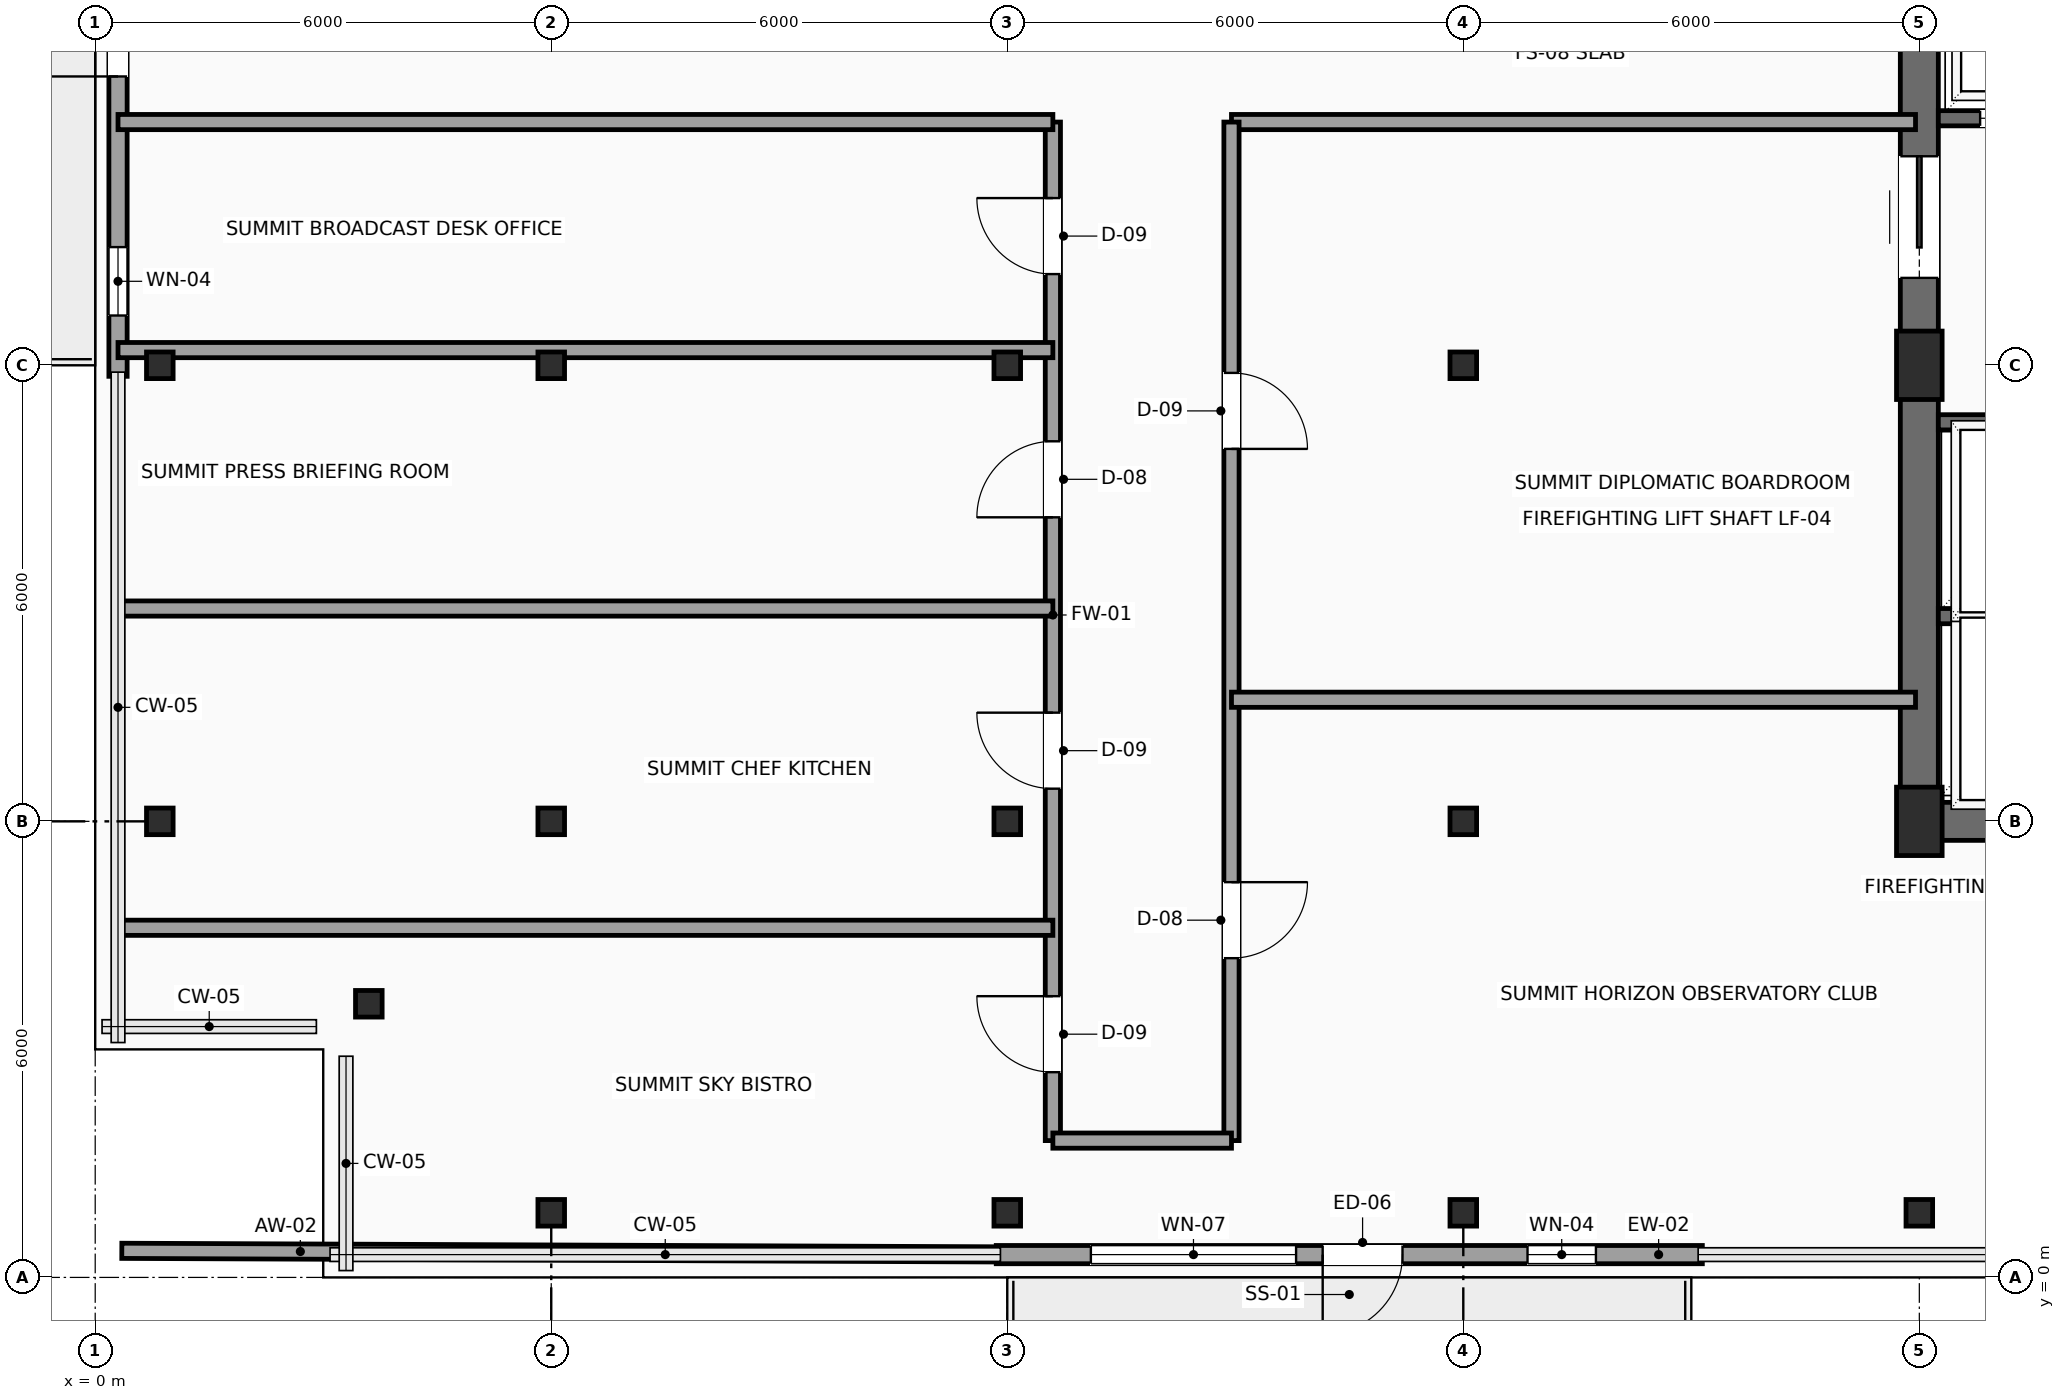
"""IFC4 building model, lengths in metres.
Left out: names, types, materials, properties, quantities, classifications, styles, units other than length and angle.
Written with IfcOpenShell. Run it as: python <this file> out.ifc"""

import sys

from ifc_helpers import new_model, si_unit, direction, frame, frame_2d, origin, origin_2d, place, context, subcontext, project, spatial, rectangle, hollow_rectangle, extrude, element, fill, save


model = new_model("IFC4")
c1 = context("Model", 3, precision=1e-05, world=origin(), true_north=direction((0.0, 1.0)))
c2 = subcontext(c1, "Body", "Model", "MODEL_VIEW")
j1 = project(units=[si_unit("LENGTHUNIT", "METRE"), si_unit("PLANEANGLEUNIT", "RADIAN")], contexts=[c1])
p1 = place(None, origin())
s1 = spatial("IfcSite", under=j1, at=p1, CompositionType="ELEMENT")
p2 = place(p1, origin())
s2 = spatial("IfcBuilding", under=s1, at=p2, CompositionType="ELEMENT")
p3 = place(p2, frame((0.0, 0.0, 278.2)))
s3 = spatial("IfcBuildingStorey", under=s2, at=p3, CompositionType="ELEMENT", Elevation=278.2)
for number, where, z_axis, x_axis in (
    (1, (24.0, 6.0, 0.0), (0.0, 0.0, 1.0), (1.0, 0.0, 0.0)),
    (2, (24.0, 12.0, 0.0), (0.0, 0.0, 1.0), (1.0, 0.0, 0.0)),
):
    element("IfcColumn", number, at=place(p3, frame(where, z_axis=z_axis, x_axis=x_axis)), inside=s3, PredefinedType="COLUMN", context=c2, shape_type="SweptSolid", body=[
        extrude(rectangle(XDim=0.6, YDim=0.9, at=origin_2d()), origin(), (0.0, 0.0, 1.0), 3.5),
    ])
for number, where, z_axis, x_axis in (
    (3, (3.6, 3.6, 0.0), (0.0, 0.0, 1.0), (1.0, 0.0, 0.0)),
    (4, (0.85, 6.0, 0.0), (0.0, 0.0, 1.0), (1.0, 0.0, 0.0)),
    (5, (0.85, 12.0, 0.0), (0.0, 0.0, 1.0), (1.0, 0.0, 0.0)),
    (6, (6.0, 0.85, 0.0), (0.0, 0.0, 1.0), (1.0, 0.0, 0.0)),
    (7, (6.0, 6.0, 0.0), (0.0, 0.0, 1.0), (1.0, 0.0, 0.0)),
    (8, (6.0, 12.0, 0.0), (0.0, 0.0, 1.0), (1.0, 0.0, 0.0)),
    (9, (12.0, 0.85, 0.0), (0.0, 0.0, 1.0), (1.0, 0.0, 0.0)),
    (10, (12.0, 6.0, 0.0), (0.0, 0.0, 1.0), (1.0, 0.0, 0.0)),
    (11, (12.0, 12.0, 0.0), (0.0, 0.0, 1.0), (1.0, 0.0, 0.0)),
    (12, (18.0, 0.85, 0.0), (0.0, 0.0, 1.0), (1.0, 0.0, 0.0)),
    (13, (18.0, 6.0, 0.0), (0.0, 0.0, 1.0), (1.0, 0.0, 0.0)),
    (14, (18.0, 12.0, 0.0), (0.0, 0.0, 1.0), (1.0, 0.0, 0.0)),
    (15, (24.0, 0.85, 0.0), (0.0, 0.0, 1.0), (1.0, 0.0, 0.0)),
):
    element("IfcColumn", number, at=place(p3, frame(where, z_axis=z_axis, x_axis=x_axis)), inside=s3, PredefinedType="COLUMN", context=c2, shape_type="SweptSolid", body=[
        extrude(hollow_rectangle(XDim=0.35, YDim=0.35, WallThickness=0.016, InnerFilletRadius=0.016, OuterFilletRadius=0.032, at=origin_2d()), origin(), (0.0, 0.0, 1.0), 3.5),
    ])
p4 = place(p3, frame((21.145, 0.3, 0.0), z_axis=(0.0, 0.0, 1.0), x_axis=(-1.0, 0.0, 0.0)))
e16 = element("IfcWall", 16, at=p4, inside=s3, PredefinedType="SOLIDWALL", context=c2, shape_type="SweptSolid", body=[
    extrude(rectangle(XDim=9.29, YDim=0.24, at=frame_2d((4.645, 0.0))), origin(), (0.0, 0.0, 1.0), 3.3),
])
p5 = place(p4, frame((3.945, 0.0, 0.0)))
e17 = element("IfcOpeningElement", 17, at=p5, cuts=e16, PredefinedType="OPENING", context=c2, shape_type="SweptSolid", body=[
    extrude(rectangle(XDim=1.05, YDim=2.2, at=frame_2d((0.525, 1.1))), frame((0.0, 0.13, 0.0), z_axis=(0.0, -1.0, 0.0), x_axis=(1.0, 0.0, 0.0)), (0.0, 0.0, 1.0), 0.26),
])
p6 = place(p4, frame((5.345, 0.0, 0.6)))
e18 = element("IfcOpeningElement", 18, at=p6, cuts=e16, PredefinedType="OPENING", context=c2, shape_type="SweptSolid", body=[
    extrude(rectangle(XDim=2.7, YDim=2.3, at=frame_2d((1.35, 1.15))), frame((0.0, 0.13, 0.0), z_axis=(0.0, -1.0, 0.0), x_axis=(1.0, 0.0, 0.0)), (0.0, 0.0, 1.0), 0.26),
])
p7 = place(p4, frame((1.4, 0.0, 0.6)))
e19 = element("IfcOpeningElement", 19, at=p7, cuts=e16, PredefinedType="OPENING", context=c2, shape_type="SweptSolid", body=[
    extrude(rectangle(XDim=0.9, YDim=2.2, at=frame_2d((0.45, 1.1))), frame((0.0, 0.13, 0.0), z_axis=(0.0, -1.0, 0.0), x_axis=(1.0, 0.0, 0.0)), (0.0, 0.0, 1.0), 0.26),
])
p8 = place(p3, frame((0.3, 11.855, 0.0), z_axis=(0.0, 0.0, 1.0), x_axis=(0.0, 1.0, 0.0)))
e20 = element("IfcWall", 20, at=p8, inside=s3, PredefinedType="SOLIDWALL", context=c2, shape_type="SweptSolid", body=[
    extrude(rectangle(XDim=9.29, YDim=0.24, at=frame_2d((4.645, 0.0))), origin(), (0.0, 0.0, 1.0), 3.3),
])
p9 = place(p8, frame((3.945, 0.0, 0.0)))
e21 = element("IfcOpeningElement", 21, at=p9, cuts=e20, PredefinedType="OPENING", context=c2, shape_type="SweptSolid", body=[
    extrude(rectangle(XDim=1.05, YDim=2.2, at=frame_2d((0.525, 1.1))), frame((0.0, 0.13, 0.0), z_axis=(0.0, -1.0, 0.0), x_axis=(1.0, 0.0, 0.0)), (0.0, 0.0, 1.0), 0.26),
])
p10 = place(p8, frame((6.2, 0.0, 0.6)))
e22 = element("IfcOpeningElement", 22, at=p10, cuts=e20, PredefinedType="OPENING", context=c2, shape_type="SweptSolid", body=[
    extrude(rectangle(XDim=2.7, YDim=2.3, at=frame_2d((1.35, 1.15))), frame((0.0, 0.13, 0.0), z_axis=(0.0, -1.0, 0.0), x_axis=(1.0, 0.0, 0.0)), (0.0, 0.0, 1.0), 0.26),
])
p11 = place(p8, frame((0.8, 0.0, 0.6)))
e23 = element("IfcOpeningElement", 23, at=p11, cuts=e20, PredefinedType="OPENING", context=c2, shape_type="SweptSolid", body=[
    extrude(rectangle(XDim=0.9, YDim=2.2, at=frame_2d((0.45, 1.1))), frame((0.0, 0.13, 0.0), z_axis=(0.0, -1.0, 0.0), x_axis=(1.0, 0.0, 0.0)), (0.0, 0.0, 1.0), 0.26),
])
p12 = place(p3, frame((24.0, 6.0, 0.0), z_axis=(0.0, 0.0, 1.0), x_axis=(1.0, 0.0, 0.0)))
e24 = element("IfcWall", 24, at=p12, inside=s3, PredefinedType="SHEAR", context=c2, shape_type="SweptSolid", body=[
    extrude(rectangle(XDim=9.6, YDim=0.5, at=frame_2d((4.8, 0.0))), origin(), (0.0, 0.0, 1.0), 3.3),
])
p13 = place(p3, frame((24.0, 6.0, 0.0), z_axis=(0.0, 0.0, 1.0), x_axis=(0.0, 1.0, 0.0)))
e25 = element("IfcWall", 25, at=p13, inside=s3, PredefinedType="SHEAR", context=c2, shape_type="SweptSolid", body=[
    extrude(rectangle(XDim=12.0, YDim=0.5, at=frame_2d((6.0, 0.0))), origin(), (0.0, 0.0, 1.0), 3.3),
])
p14 = place(p13, frame((7.15, 0.0, 0.0)))
e26 = element("IfcOpeningElement", 26, at=p14, cuts=e25, PredefinedType="OPENING", context=c2, shape_type="SweptSolid", body=[
    extrude(rectangle(XDim=1.6, YDim=2.3, at=frame_2d((0.8, 1.15))), frame((0.0, 0.26, 0.0), z_axis=(0.0, -1.0, 0.0), x_axis=(1.0, 0.0, 0.0)), (0.0, 0.0, 1.0), 0.52),
])
for number, where, z_axis, x_axis in (
    (27, (24.25, 8.7, 0.0), (0.0, 0.0, 1.0), (1.0, 0.0, 0.0)),
    (28, (24.25, 11.25, 0.0), (0.0, 0.0, 1.0), (1.0, 0.0, 0.0)),
):
    element("IfcWall", number, at=place(p3, frame(where, z_axis=z_axis, x_axis=x_axis)), inside=s3, PredefinedType="SHEAR", context=c2, shape_type="SweptSolid", body=[
        extrude(rectangle(XDim=2.17, YDim=0.2, at=frame_2d((1.085, 0.0))), origin(), (0.0, 0.0, 1.0), 3.3),
    ])
p15 = place(p3, frame((24.25, 15.25, 0.0), z_axis=(0.0, 0.0, 1.0), x_axis=(1.0, 0.0, 0.0)))
e29 = element("IfcWall", 29, at=p15, inside=s3, PredefinedType="SHEAR", context=c2, shape_type="SweptSolid", body=[
    extrude(rectangle(XDim=5.2, YDim=0.2, at=frame_2d((2.6, 0.0))), origin(), (0.0, 0.0, 1.0), 3.3),
])
p16 = place(p15, frame((0.55, 0.0, 0.0)))
e30 = element("IfcOpeningElement", 30, at=p16, cuts=e29, PredefinedType="OPENING", context=c2, shape_type="SweptSolid", body=[
    extrude(rectangle(XDim=1.2, YDim=2.2, at=frame_2d((0.6, 1.1))), frame((0.0, 0.11, 0.0), z_axis=(0.0, -1.0, 0.0), x_axis=(1.0, 0.0, 0.0)), (0.0, 0.0, 1.0), 0.22),
])
p17 = place(p15, frame((3.15, 0.0, 0.0)))
e31 = element("IfcOpeningElement", 31, at=p17, cuts=e29, PredefinedType="OPENING", context=c2, shape_type="SweptSolid", body=[
    extrude(rectangle(XDim=1.2, YDim=2.2, at=frame_2d((0.6, 1.1))), frame((0.0, 0.11, 0.0), z_axis=(0.0, -1.0, 0.0), x_axis=(1.0, 0.0, 0.0)), (0.0, 0.0, 1.0), 0.22),
])
p18 = place(p3, frame((12.6, 1.8, 0.0), z_axis=(0.0, 0.0, 1.0), x_axis=(0.0, 1.0, 0.0)))
e32 = element("IfcWall", 32, at=p18, inside=s3, PredefinedType="SOLIDWALL", context=c2, shape_type="SweptSolid", body=[
    extrude(rectangle(XDim=13.4, YDim=0.2, at=frame_2d((6.7, 0.0))), origin(), (0.0, 0.0, 1.0), 3.3),
])
p19 = place(p18, frame((0.9, 0.0, 0.0)))
e33 = element("IfcOpeningElement", 33, at=p19, cuts=e32, PredefinedType="OPENING", context=c2, shape_type="SweptSolid", body=[
    extrude(rectangle(XDim=1.0, YDim=2.2, at=frame_2d((0.5, 1.1))), frame((0.0, 0.11, 0.0), z_axis=(0.0, -1.0, 0.0), x_axis=(1.0, 0.0, 0.0)), (0.0, 0.0, 1.0), 0.22),
])
p20 = place(p18, frame((4.63, 0.0, 0.0)))
e34 = element("IfcOpeningElement", 34, at=p20, cuts=e32, PredefinedType="OPENING", context=c2, shape_type="SweptSolid", body=[
    extrude(rectangle(XDim=1.0, YDim=2.2, at=frame_2d((0.5, 1.1))), frame((0.0, 0.11, 0.0), z_axis=(0.0, -1.0, 0.0), x_axis=(1.0, 0.0, 0.0)), (0.0, 0.0, 1.0), 0.22),
])
p21 = place(p18, frame((8.2, 0.0, 0.0)))
e35 = element("IfcOpeningElement", 35, at=p21, cuts=e32, PredefinedType="OPENING", context=c2, shape_type="SweptSolid", body=[
    extrude(rectangle(XDim=1.0, YDim=2.2, at=frame_2d((0.5, 1.1))), frame((0.0, 0.11, 0.0), z_axis=(0.0, -1.0, 0.0), x_axis=(1.0, 0.0, 0.0)), (0.0, 0.0, 1.0), 0.22),
])
p22 = place(p18, frame((11.4, 0.0, 0.0)))
e36 = element("IfcOpeningElement", 36, at=p22, cuts=e32, PredefinedType="OPENING", context=c2, shape_type="SweptSolid", body=[
    extrude(rectangle(XDim=1.0, YDim=2.2, at=frame_2d((0.5, 1.1))), frame((0.0, 0.11, 0.0), z_axis=(0.0, -1.0, 0.0), x_axis=(1.0, 0.0, 0.0)), (0.0, 0.0, 1.0), 0.22),
])
p23 = place(p3, frame((12.6, 15.2, 0.0), z_axis=(0.0, 0.0, 1.0), x_axis=(-1.0, 0.0, 0.0)))
e37 = element("IfcWall", 37, at=p23, inside=s3, PredefinedType="SOLIDWALL", context=c2, shape_type="SweptSolid", body=[
    extrude(rectangle(XDim=12.3, YDim=0.2, at=frame_2d((6.15, 0.0))), origin(), (0.0, 0.0, 1.0), 2.932),
])
p24 = place(p3, frame((23.95, 15.2, 0.0), z_axis=(0.0, 0.0, 1.0), x_axis=(-1.0, 0.0, 0.0)))
e38 = element("IfcWall", 38, at=p24, inside=s3, PredefinedType="SOLIDWALL", context=c2, shape_type="SweptSolid", body=[
    extrude(rectangle(XDim=9.0, YDim=0.2, at=frame_2d((4.5, 0.0))), origin(), (0.0, 0.0, 1.0), 2.932),
])
p25 = place(p3, frame((14.95, 15.2, 0.0), z_axis=(0.0, 0.0, 1.0), x_axis=(0.0, -1.0, 0.0)))
e39 = element("IfcWall", 39, at=p25, inside=s3, PredefinedType="SOLIDWALL", context=c2, shape_type="SweptSolid", body=[
    extrude(rectangle(XDim=13.4, YDim=0.2, at=frame_2d((6.7, 0.0))), origin(), (0.0, 0.0, 1.0), 3.3),
])
p26 = place(p25, frame((10.0, 0.0, 0.0)))
e40 = element("IfcOpeningElement", 40, at=p26, cuts=e39, PredefinedType="OPENING", context=c2, shape_type="SweptSolid", body=[
    extrude(rectangle(XDim=1.0, YDim=2.2, at=frame_2d((0.5, 1.1))), frame((0.0, 0.11, 0.0), z_axis=(0.0, -1.0, 0.0), x_axis=(1.0, 0.0, 0.0)), (0.0, 0.0, 1.0), 0.22),
])
p27 = place(p25, frame((3.3, 0.0, 0.0)))
e41 = element("IfcOpeningElement", 41, at=p27, cuts=e39, PredefinedType="OPENING", context=c2, shape_type="SweptSolid", body=[
    extrude(rectangle(XDim=1.0, YDim=2.2, at=frame_2d((0.5, 1.1))), frame((0.0, 0.11, 0.0), z_axis=(0.0, -1.0, 0.0), x_axis=(1.0, 0.0, 0.0)), (0.0, 0.0, 1.0), 0.22),
])
p28 = place(p3, frame((14.95, 1.8, 0.0), z_axis=(0.0, 0.0, 1.0), x_axis=(-1.0, 0.0, 0.0)))
e42 = element("IfcWall", 42, at=p28, inside=s3, PredefinedType="SOLIDWALL", context=c2, shape_type="SweptSolid", body=[
    extrude(rectangle(XDim=2.35, YDim=0.2, at=frame_2d((1.175, 0.0))), origin(), (0.0, 0.0, 1.0), 3.3),
])
p29 = place(p3, frame((0.35, 0.35, 0.0), z_axis=(0.0, 0.0, 1.0), x_axis=(0.999991613227, -0.004095543276, 0.0)))
e43 = element("IfcWall", 43, at=p29, inside=s3, PredefinedType="PARTITIONING", context=c2, shape_type="SweptSolid", body=[
    extrude(rectangle(XDim=11.505, YDim=0.2, at=frame_2d((5.752, 0.0))), origin(), (0.0, 0.0, 1.0), 3.3),
])
p30 = place(p3, frame((0.3, 4.6, 0.0), z_axis=(0.0, 0.0, 1.0), x_axis=(1.0, 0.0, 0.0)))
e44 = element("IfcWall", 44, at=p30, inside=s3, PredefinedType="PARTITIONING", context=c2, shape_type="SweptSolid", body=[
    extrude(rectangle(XDim=12.3, YDim=0.2, at=frame_2d((6.15, 0.0))), origin(), (0.0, 0.0, 1.0), 3.3),
])
p31 = place(p3, frame((0.3, 8.8, 0.0), z_axis=(0.0, 0.0, 1.0), x_axis=(1.0, 0.0, 0.0)))
e45 = element("IfcWall", 45, at=p31, inside=s3, PredefinedType="PARTITIONING", context=c2, shape_type="SweptSolid", body=[
    extrude(rectangle(XDim=12.3, YDim=0.2, at=frame_2d((6.15, 0.0))), origin(), (0.0, 0.0, 1.0), 2.932),
])
p32 = place(p3, frame((0.3, 12.2, 0.0), z_axis=(0.0, 0.0, 1.0), x_axis=(1.0, 0.0, 0.0)))
e46 = element("IfcWall", 46, at=p32, inside=s3, PredefinedType="PARTITIONING", context=c2, shape_type="SweptSolid", body=[
    extrude(rectangle(XDim=12.3, YDim=0.2, at=frame_2d((6.15, 0.0))), origin(), (0.0, 0.0, 1.0), 2.967),
])
p33 = place(p3, frame((14.95, 7.6, 0.0), z_axis=(0.0, 0.0, 1.0), x_axis=(1.0, 0.0, 0.0)))
e47 = element("IfcWall", 47, at=p33, inside=s3, PredefinedType="PARTITIONING", context=c2, shape_type="SweptSolid", body=[
    extrude(rectangle(XDim=9.0, YDim=0.2, at=frame_2d((4.5, 0.0))), origin(), (0.0, 0.0, 1.0), 3.3),
])
p34 = place(p5, origin())
e48 = element("IfcDoor", 48, at=p34, inside=s3, OperationType="SINGLE_SWING_RIGHT", PredefinedType="DOOR", context=c2, shape_type="SweptSolid", body=[
    extrude(rectangle(XDim=1.05, YDim=2.2, at=frame_2d((0.525, 1.1))), frame((0.0, 0.025, 0.0), z_axis=(0.0, -1.0, 0.0), x_axis=(1.0, 0.0, 0.0)), (0.0, 0.0, 1.0), 0.05),
])
fill(e17, e48)
p35 = place(p6, origin())
e49 = element("IfcWindow", 49, at=p35, inside=s3, PartitioningType="SINGLE_PANEL", PredefinedType="WINDOW", context=c2, shape_type="SweptSolid", body=[
    extrude(rectangle(XDim=2.7, YDim=2.3, at=frame_2d((1.35, 1.15))), frame((0.0, 0.03, 0.0), z_axis=(0.0, -1.0, 0.0), x_axis=(1.0, 0.0, 0.0)), (0.0, 0.0, 1.0), 0.06),
])
fill(e18, e49)
p36 = place(p7, origin())
e50 = element("IfcWindow", 50, at=p36, inside=s3, PartitioningType="SINGLE_PANEL", PredefinedType="WINDOW", context=c2, shape_type="SweptSolid", body=[
    extrude(rectangle(XDim=0.9, YDim=2.2, at=frame_2d((0.45, 1.1))), frame((0.0, 0.03, 0.0), z_axis=(0.0, -1.0, 0.0), x_axis=(1.0, 0.0, 0.0)), (0.0, 0.0, 1.0), 0.06),
])
fill(e19, e50)
p37 = place(p9, origin())
e51 = element("IfcDoor", 51, at=p37, inside=s3, OperationType="SINGLE_SWING_LEFT", PredefinedType="DOOR", context=c2, shape_type="SweptSolid", body=[
    extrude(rectangle(XDim=1.05, YDim=2.2, at=frame_2d((0.525, 1.1))), frame((0.0, 0.025, 0.0), z_axis=(0.0, -1.0, 0.0), x_axis=(1.0, 0.0, 0.0)), (0.0, 0.0, 1.0), 0.05),
])
fill(e21, e51)
p38 = place(p11, origin())
e52 = element("IfcWindow", 52, at=p38, inside=s3, PartitioningType="SINGLE_PANEL", PredefinedType="WINDOW", context=c2, shape_type="SweptSolid", body=[
    extrude(rectangle(XDim=0.9, YDim=2.2, at=frame_2d((0.45, 1.1))), frame((0.0, 0.03, 0.0), z_axis=(0.0, -1.0, 0.0), x_axis=(1.0, 0.0, 0.0)), (0.0, 0.0, 1.0), 0.06),
])
fill(e23, e52)
p39 = place(p14, origin())
e53 = element("IfcDoor", 53, at=p39, inside=s3, OperationType="DOUBLE_DOOR_SLIDING", PredefinedType="DOOR", context=c2, shape_type="SweptSolid", body=[
    extrude(rectangle(XDim=1.6, YDim=2.3, at=frame_2d((0.8, 1.15))), frame((0.0, 0.025, 0.0), z_axis=(0.0, -1.0, 0.0), x_axis=(1.0, 0.0, 0.0)), (0.0, 0.0, 1.0), 0.05),
])
fill(e26, e53)
p40 = place(p16, origin())
e54 = element("IfcDoor", 54, at=p40, inside=s3, OperationType="SLIDING_TO_RIGHT", PredefinedType="DOOR", context=c2, shape_type="SweptSolid", body=[
    extrude(rectangle(XDim=1.2, YDim=2.2, at=frame_2d((0.6, 1.1))), frame((0.0, 0.025, 0.0), z_axis=(0.0, -1.0, 0.0), x_axis=(1.0, 0.0, 0.0)), (0.0, 0.0, 1.0), 0.05),
])
fill(e30, e54)
p41 = place(p19, origin())
e55 = element("IfcDoor", 55, at=p41, inside=s3, OperationType="SINGLE_SWING_RIGHT", PredefinedType="DOOR", context=c2, shape_type="SweptSolid", body=[
    extrude(rectangle(XDim=1.0, YDim=2.2, at=frame_2d((0.5, 1.1))), frame((0.0, 0.025, 0.0), z_axis=(0.0, -1.0, 0.0), x_axis=(1.0, 0.0, 0.0)), (0.0, 0.0, 1.0), 0.05),
])
fill(e33, e55)
p42 = place(p20, origin())
e56 = element("IfcDoor", 56, at=p42, inside=s3, OperationType="SINGLE_SWING_RIGHT", PredefinedType="DOOR", context=c2, shape_type="SweptSolid", body=[
    extrude(rectangle(XDim=1.0, YDim=2.2, at=frame_2d((0.5, 1.1))), frame((0.0, 0.025, 0.0), z_axis=(0.0, -1.0, 0.0), x_axis=(1.0, 0.0, 0.0)), (0.0, 0.0, 1.0), 0.05),
])
fill(e34, e56)
p43 = place(p21, origin())
e57 = element("IfcDoor", 57, at=p43, inside=s3, OperationType="SINGLE_SWING_LEFT", PredefinedType="DOOR", context=c2, shape_type="SweptSolid", body=[
    extrude(rectangle(XDim=1.0, YDim=2.2, at=frame_2d((0.5, 1.1))), frame((0.0, 0.025, 0.0), z_axis=(0.0, -1.0, 0.0), x_axis=(1.0, 0.0, 0.0)), (0.0, 0.0, 1.0), 0.05),
])
fill(e35, e57)
p44 = place(p22, origin())
e58 = element("IfcDoor", 58, at=p44, inside=s3, OperationType="SINGLE_SWING_RIGHT", PredefinedType="DOOR", context=c2, shape_type="SweptSolid", body=[
    extrude(rectangle(XDim=1.0, YDim=2.2, at=frame_2d((0.5, 1.1))), frame((0.0, 0.025, 0.0), z_axis=(0.0, -1.0, 0.0), x_axis=(1.0, 0.0, 0.0)), (0.0, 0.0, 1.0), 0.05),
])
fill(e36, e58)
p45 = place(p26, origin())
e59 = element("IfcDoor", 59, at=p45, inside=s3, OperationType="SINGLE_SWING_LEFT", PredefinedType="DOOR", context=c2, shape_type="SweptSolid", body=[
    extrude(rectangle(XDim=1.0, YDim=2.2, at=frame_2d((0.5, 1.1))), frame((0.0, 0.025, 0.0), z_axis=(0.0, -1.0, 0.0), x_axis=(1.0, 0.0, 0.0)), (0.0, 0.0, 1.0), 0.05),
])
fill(e40, e59)
p46 = place(p27, origin())
e60 = element("IfcDoor", 60, at=p46, inside=s3, OperationType="SINGLE_SWING_RIGHT", PredefinedType="DOOR", context=c2, shape_type="SweptSolid", body=[
    extrude(rectangle(XDim=1.0, YDim=2.2, at=frame_2d((0.5, 1.1))), frame((0.0, 0.025, 0.0), z_axis=(0.0, -1.0, 0.0), x_axis=(1.0, 0.0, 0.0)), (0.0, 0.0, 1.0), 0.05),
])
fill(e41, e60)
save(model, sys.argv[1])
